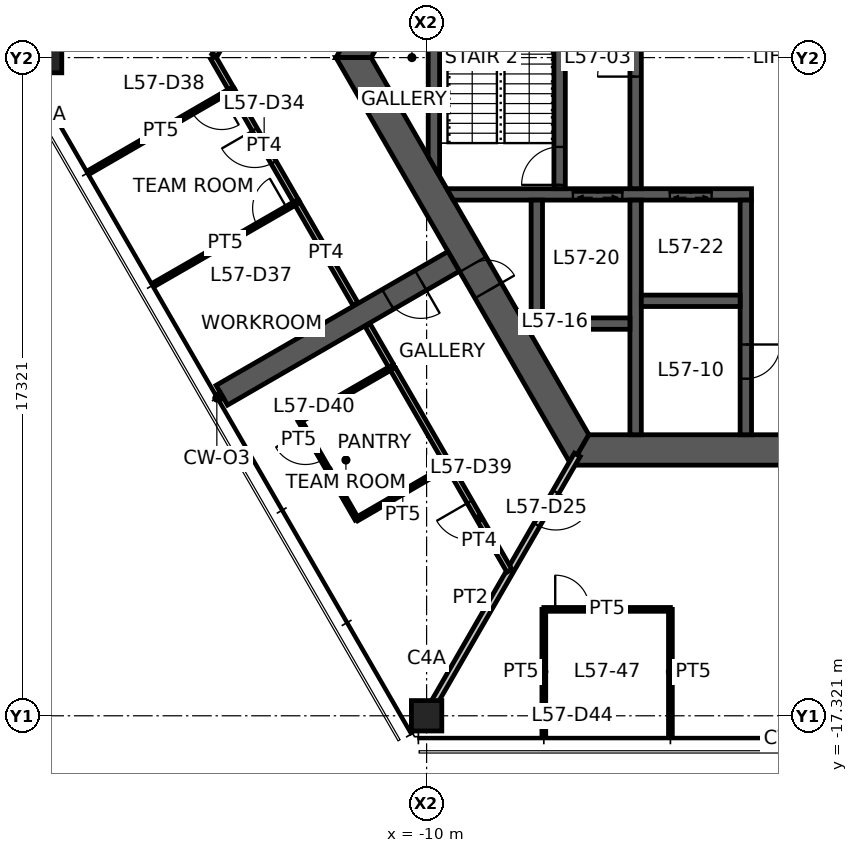
"""IFC4 building model, lengths in metres.
Left out: names, types, materials, properties, quantities, classifications, styles, units other than length and angle.
Written with IfcOpenShell. Run it as: python <this file> out.ifc"""

import sys

from ifc_helpers import new_model, si_unit, direction, frame, frame_2d, origin, origin_2d, place, context, subcontext, project, spatial, polyline, rectangle, hollow_rectangle, outline, extrude, element, fill, save


model = new_model("IFC4")
c1 = context("Model", 3, precision=1e-05, world=origin(), true_north=direction((0.0, 1.0)))
c2 = subcontext(c1, "Body", "Model", "MODEL_VIEW")
j1 = project(units=[si_unit("LENGTHUNIT", "METRE"), si_unit("PLANEANGLEUNIT", "RADIAN")], contexts=[c1])
p1 = place(None, origin())
s1 = spatial("IfcSite", under=j1, at=p1, CompositionType="ELEMENT")
p2 = place(p1, origin())
s2 = spatial("IfcBuilding", under=s1, at=p2, CompositionType="ELEMENT")
p3 = place(p2, frame((0.0, 0.0, 228.4)))
s3 = spatial("IfcBuildingStorey", under=s2, at=p3, CompositionType="ELEMENT", Elevation=228.4)
for number, where, z_axis, x_axis in (
    (1, (-20.0, 0.0, 0.0), (0.0, 0.0, 1.0), (1.0, 0.0, 0.0)),
    (2, (-10.0, -17.321, 0.0), (0.0, 0.0, 1.0), (1.0, 0.0, 0.0)),
):
    element("IfcColumn", number, at=place(p3, frame(where, z_axis=z_axis, x_axis=x_axis)), inside=s3, PredefinedType="COLUMN", context=c2, shape_type="SweptSolid", body=[
        extrude(hollow_rectangle(XDim=0.8, YDim=0.8, WallThickness=0.04, at=origin_2d()), origin(), (0.0, 0.0, 1.0), 3.9),
    ])
p4 = place(p3, frame((-5.961, 10.325, 0.0), z_axis=(0.0, 0.0, 1.0), x_axis=(-0.500004296715, -0.866022923061, 0.0)))
e3 = element("IfcWall", 3, at=p4, inside=s3, PredefinedType="SHEAR", context=c2, shape_type="SweptSolid", body=[
    extrude(outline(polyline([(-0.231, -0.4), (4.494, -0.4), (5.494, -0.4), (12.153, -0.4), (11.691, 0.4), (5.494, 0.4), (4.494, 0.4), (0.231, 0.4), (-0.231, -0.4)])), origin(), (0.0, 0.0, 1.0), 3.9),
])
p5 = place(p4, frame((4.494, 0.0, 0.0)))
e4 = element("IfcOpeningElement", 4, at=p5, cuts=e3, PredefinedType="OPENING", context=c2, shape_type="SweptSolid", body=[
    extrude(rectangle(XDim=1.0, YDim=2.1, at=frame_2d((0.5, 1.05))), frame((0.0, 0.41, 0.0), z_axis=(0.0, -1.0, 0.0), x_axis=(1.0, 0.0, 0.0)), (0.0, 0.0, 1.0), 0.82),
])
p6 = place(p3, frame((-11.922, 0.0, 0.0), z_axis=(0.0, 0.0, 1.0), x_axis=(0.500004296715, -0.866022923061, 0.0)))
e5 = element("IfcWall", 5, at=p6, inside=s3, PredefinedType="SHEAR", context=c2, shape_type="SweptSolid", body=[
    extrude(outline(polyline([(-0.231, -0.4), (6.281, -0.4), (7.081, -0.4), (12.153, -0.4), (11.691, 0.4), (7.081, 0.4), (6.281, 0.4), (0.231, 0.4), (-0.231, -0.4)])), origin(), (0.0, 0.0, 1.0), 3.9),
])
p7 = place(p6, frame((6.281, 0.0, 0.0)))
e6 = element("IfcOpeningElement", 6, at=p7, cuts=e5, PredefinedType="OPENING", context=c2, shape_type="SweptSolid", body=[
    extrude(rectangle(XDim=0.8, YDim=2.1, at=frame_2d((0.4, 1.05))), frame((0.0, 0.41, 0.0), z_axis=(0.0, -1.0, 0.0), x_axis=(1.0, 0.0, 0.0)), (0.0, 0.0, 1.0), 0.82),
])
p8 = place(p3, frame((-5.961, -10.325, 0.0), z_axis=(0.0, 0.0, 1.0), x_axis=(1.0, 0.0, 0.0)))
e7 = element("IfcWall", 7, at=p8, inside=s3, PredefinedType="SHEAR", context=c2, shape_type="SweptSolid", body=[
    extrude(outline(polyline([(-0.231, -0.4), (5.461, -0.4), (6.461, -0.4), (12.153, -0.4), (11.691, 0.4), (6.461, 0.4), (5.461, 0.4), (0.231, 0.4), (-0.231, -0.4)])), origin(), (0.0, 0.0, 1.0), 3.9),
])
p9 = place(p8, frame((5.461, 0.0, 0.0)))
e8 = element("IfcOpeningElement", 8, at=p9, cuts=e7, PredefinedType="OPENING", context=c2, shape_type="SweptSolid", body=[
    extrude(rectangle(XDim=1.0, YDim=2.1, at=frame_2d((0.5, 1.05))), frame((0.0, 0.41, 0.0), z_axis=(0.0, -1.0, 0.0), x_axis=(1.0, 0.0, 0.0)), (0.0, 0.0, 1.0), 0.82),
])
p10 = place(p3, frame((-9.288, -5.363, 0.0), z_axis=(0.0, 0.0, 1.0), x_axis=(-0.866027473358, -0.499996415376, 0.0)))
e9 = element("IfcWall", 9, at=p10, inside=s3, PredefinedType="SHEAR", context=c2, shape_type="SweptSolid", body=[
    extrude(rectangle(XDim=7.045, YDim=0.6, at=frame_2d((3.523, 0.0))), origin(), (0.0, 0.0, 1.0), 3.9),
])
p11 = place(p10, frame((1.0, 0.0, 0.0)))
e10 = element("IfcOpeningElement", 10, at=p11, cuts=e9, PredefinedType="OPENING", context=c2, shape_type="SweptSolid", body=[
    extrude(rectangle(XDim=1.0, YDim=2.1, at=frame_2d((0.5, 1.05))), frame((0.0, 0.31, 0.0), z_axis=(0.0, -1.0, 0.0), x_axis=(1.0, 0.0, 0.0)), (0.0, 0.0, 1.0), 0.62),
])
p12 = place(p3, frame((-9.382, -3.6, 0.0), z_axis=(0.0, 0.0, 1.0), x_axis=(1.0, 0.0, 0.0)))
e11 = element("IfcWall", 11, at=p12, inside=s3, PredefinedType="SHEAR", context=c2, shape_type="SweptSolid", body=[
    extrude(outline(polyline([(0.087, -0.15), (3.232, -0.15), (4.532, -0.15), (5.782, -0.15), (6.882, -0.15), (7.932, -0.15), (7.932, 0.15), (6.882, 0.15), (5.782, 0.15), (4.532, 0.15), (3.232, 0.15), (-0.087, 0.15), (0.087, -0.15)])), origin(), (0.0, 0.0, 1.0), 3.9),
])
p13 = place(p12, frame((5.782, 0.0, 0.0)))
e12 = element("IfcOpeningElement", 12, at=p13, cuts=e11, PredefinedType="OPENING", context=c2, shape_type="SweptSolid", body=[
    extrude(rectangle(XDim=1.1, YDim=2.1, at=frame_2d((0.55, 1.05))), frame((0.0, 0.16, 0.0), z_axis=(0.0, -1.0, 0.0), x_axis=(1.0, 0.0, 0.0)), (0.0, 0.0, 1.0), 0.32),
])
p14 = place(p12, frame((3.232, 0.0, 0.0)))
e13 = element("IfcOpeningElement", 13, at=p14, cuts=e11, PredefinedType="OPENING", context=c2, shape_type="SweptSolid", body=[
    extrude(rectangle(XDim=1.3, YDim=2.1, at=frame_2d((0.65, 1.05))), frame((0.0, 0.16, 0.0), z_axis=(0.0, -1.0, 0.0), x_axis=(1.0, 0.0, 0.0)), (0.0, 0.0, 1.0), 0.32),
])
p15 = place(p3, frame((-1.6, -3.75, 0.0), z_axis=(0.0, 0.0, 1.0), x_axis=(0.0, -1.0, 0.0)))
e14 = element("IfcWall", 14, at=p15, inside=s3, PredefinedType="SHEAR", context=c2, shape_type="SweptSolid", body=[
    extrude(rectangle(XDim=6.175, YDim=0.3, at=frame_2d((3.087, 0.0))), origin(), (0.0, 0.0, 1.0), 3.9),
])
p16 = place(p15, frame((3.8, 0.0, 0.0)))
e15 = element("IfcOpeningElement", 15, at=p16, cuts=e14, PredefinedType="OPENING", context=c2, shape_type="SweptSolid", body=[
    extrude(rectangle(XDim=0.9, YDim=2.1, at=frame_2d((0.45, 1.05))), frame((0.0, 0.16, 0.0), z_axis=(0.0, -1.0, 0.0), x_axis=(1.0, 0.0, 0.0)), (0.0, 0.0, 1.0), 0.32),
])
p17 = place(p3, frame((-4.5, -3.45, 0.0), z_axis=(0.0, 0.0, 1.0), x_axis=(0.0, 1.0, 0.0)))
e16 = element("IfcWall", 16, at=p17, inside=s3, PredefinedType="SHEAR", context=c2, shape_type="SweptSolid", body=[
    extrude(rectangle(XDim=6.9, YDim=0.3, at=frame_2d((3.45, 0.0))), origin(), (0.0, 0.0, 1.0), 3.9),
])
p18 = place(p17, frame((2.95, 0.0, 0.0)))
e17 = element("IfcOpeningElement", 17, at=p18, cuts=e16, PredefinedType="OPENING", context=c2, shape_type="SweptSolid", body=[
    extrude(rectangle(XDim=1.0, YDim=2.1, at=frame_2d((0.5, 1.05))), frame((0.0, 0.16, 0.0), z_axis=(0.0, -1.0, 0.0), x_axis=(1.0, 0.0, 0.0)), (0.0, 0.0, 1.0), 0.32),
])
p19 = place(p3, frame((-6.5, -3.45, 0.0), z_axis=(0.0, 0.0, 1.0), x_axis=(0.0, 1.0, 0.0)))
e18 = element("IfcWall", 18, at=p19, inside=s3, PredefinedType="SHEAR", context=c2, shape_type="SweptSolid", body=[
    extrude(rectangle(XDim=6.9, YDim=0.3, at=frame_2d((3.45, 0.0))), origin(), (0.0, 0.0, 1.0), 3.9),
])
p20 = place(p19, frame((0.1, 0.0, 0.0)))
e19 = element("IfcOpeningElement", 19, at=p20, cuts=e18, PredefinedType="OPENING", context=c2, shape_type="SweptSolid", body=[
    extrude(rectangle(XDim=1.0, YDim=2.1, at=frame_2d((0.5, 1.05))), frame((0.0, 0.16, 0.0), z_axis=(0.0, -1.0, 0.0), x_axis=(1.0, 0.0, 0.0)), (0.0, 0.0, 1.0), 0.32),
])
p21 = place(p3, frame((-4.5, -3.75, 0.0), z_axis=(0.0, 0.0, 1.0), x_axis=(0.0, -1.0, 0.0)))
e20 = element("IfcWall", 20, at=p21, inside=s3, PredefinedType="SHEAR", context=c2, shape_type="SweptSolid", body=[
    extrude(rectangle(XDim=6.175, YDim=0.3, at=frame_2d((3.087, 0.0))), origin(), (0.0, 0.0, 1.0), 3.9),
])
for number, where, z_axis, x_axis in (
    (21, (-4.35, -6.4, 0.0), (0.0, 0.0, 1.0), (1.0, 0.0, 0.0)),
    (22, (-7.25, -7.0, 0.0), (0.0, 0.0, 1.0), (1.0, 0.0, 0.0)),
):
    element("IfcWall", number, at=place(p3, frame(where, z_axis=z_axis, x_axis=x_axis)), inside=s3, PredefinedType="SHEAR", context=c2, shape_type="SweptSolid", body=[
        extrude(rectangle(XDim=2.6, YDim=0.3, at=frame_2d((1.3, 0.0))), origin(), (0.0, 0.0, 1.0), 3.9),
    ])
p22 = place(p3, frame((-7.1, -3.75, 0.0), z_axis=(0.0, 0.0, 1.0), x_axis=(0.0, -1.0, 0.0)))
e23 = element("IfcWall", 23, at=p22, inside=s3, PredefinedType="SHEAR", context=c2, shape_type="SweptSolid", body=[
    extrude(rectangle(XDim=3.1, YDim=0.3, at=frame_2d((1.55, 0.0))), origin(), (0.0, 0.0, 1.0), 3.9),
])
p23 = place(p3, frame((-9.808, -2.862, 0.0), z_axis=(0.0, 0.0, 1.0), x_axis=(0.0, 1.0, 0.0)))
e24 = element("IfcWall", 24, at=p23, inside=s3, PredefinedType="SHEAR", context=c2, shape_type="SweptSolid", body=[
    extrude(outline(polyline([(-0.26, -0.15), (5.984, -0.15), (5.465, 0.15), (0.26, 0.15), (-0.26, -0.15)])), origin(), (0.0, 0.0, 1.0), 3.9),
])
p24 = place(p3, frame((-6.035, -10.453, 0.0), z_axis=(0.0, 0.0, 1.0), x_axis=(-0.499989830942, -0.866031274813, 0.0)))
e25 = element("IfcWall", 25, at=p24, inside=s3, PredefinedType="PARTITIONING", context=c2, shape_type="SweptSolid", body=[
    extrude(rectangle(XDim=7.93, YDim=0.175, at=frame_2d((3.965, 0.0))), origin(), (0.0, 0.0, 1.0), 3.05),
])
p25 = place(p24, frame((1.13, 0.0, 0.0)))
e26 = element("IfcOpeningElement", 26, at=p25, cuts=e25, PredefinedType="OPENING", context=c2, shape_type="SweptSolid", body=[
    extrude(rectangle(XDim=1.0, YDim=2.1, at=frame_2d((0.5, 1.05))), frame((0.0, 0.098, 0.0), z_axis=(0.0, -1.0, 0.0), x_axis=(1.0, 0.0, 0.0)), (0.0, 0.0, 1.0), 0.195),
])
p26 = place(p3, frame((-11.873, -6.485, 0.0), z_axis=(0.0, 0.0, 1.0), x_axis=(-0.499958760481, 0.866049212123, 0.0)))
e27 = element("IfcWall", 27, at=p26, inside=s3, PredefinedType="PARTITIONING", context=c2, shape_type="SweptSolid", body=[
    extrude(rectangle(XDim=3.1, YDim=0.15, at=frame_2d((1.55, 0.0))), origin(), (0.0, 0.0, 1.0), 2.95),
])
p27 = place(p3, frame((-15.585, 0.056, 0.0), z_axis=(0.0, 0.0, 1.0), x_axis=(0.500164219654, 0.865930570761, 0.0)))
e28 = element("IfcWall", 28, at=p27, inside=s3, PredefinedType="PARTITIONING", context=c2, shape_type="SweptSolid", body=[
    extrude(rectangle(XDim=0.287, YDim=0.15, at=frame_2d((0.144, 0.0))), origin(), (0.0, 0.0, 1.0), 2.95),
])
p28 = place(p3, frame((-15.126, -0.851, 0.0), z_axis=(0.0, 0.0, 1.0), x_axis=(-0.499880173341, 0.866094574686, 0.0)))
e29 = element("IfcWall", 29, at=p28, inside=s3, PredefinedType="PARTITIONING", context=c2, shape_type="SweptSolid", body=[
    extrude(rectangle(XDim=0.983, YDim=0.15, at=frame_2d((0.491, 0.0))), origin(), (0.0, 0.0, 1.0), 2.95),
])
p29 = place(p3, frame((-13.418, -3.809, 0.0), z_axis=(0.0, 0.0, 1.0), x_axis=(-0.499996058069, 0.866027679647, 0.0)))
e30 = element("IfcWall", 30, at=p29, inside=s3, PredefinedType="PARTITIONING", context=c2, shape_type="SweptSolid", body=[
    extrude(rectangle(XDim=3.424, YDim=0.15, at=frame_2d((1.712, 0.0))), origin(), (0.0, 0.0, 1.0), 2.95),
])
p30 = place(p29, frame((1.212, 0.0, 0.0)))
e31 = element("IfcOpeningElement", 31, at=p30, cuts=e30, PredefinedType="OPENING", context=c2, shape_type="SweptSolid", body=[
    extrude(rectangle(XDim=1.0, YDim=2.1, at=frame_2d((0.5, 1.05))), frame((0.0, 0.085, 0.0), z_axis=(0.0, -1.0, 0.0), x_axis=(1.0, 0.0, 0.0)), (0.0, 0.0, 1.0), 0.17),
])
p31 = place(p3, frame((-17.171, -5.97, 0.0), z_axis=(0.0, 0.0, 1.0), x_axis=(0.866548575966, 0.499092742374, 0.0)))
e32 = element("IfcWall", 32, at=p31, inside=s3, PredefinedType="PARTITIONING", context=c2, shape_type="SweptSolid", body=[
    extrude(rectangle(XDim=4.331, YDim=0.1, at=frame_2d((2.165, 0.0))), origin(), (0.0, 0.0, 1.0), 2.95),
])
p32 = place(p31, frame((3.131, 0.0, 0.0)))
e33 = element("IfcOpeningElement", 33, at=p32, cuts=e32, PredefinedType="OPENING", context=c2, shape_type="SweptSolid", body=[
    extrude(rectangle(XDim=0.9, YDim=2.1, at=frame_2d((0.45, 1.05))), frame((0.0, 0.06, 0.0), z_axis=(0.0, -1.0, 0.0), x_axis=(1.0, 0.0, 0.0)), (0.0, 0.0, 1.0), 0.12),
])
p33 = place(p3, frame((-15.131, -0.843, 0.0), z_axis=(0.0, 0.0, 1.0), x_axis=(-0.865525911664, -0.500864149484, 0.0)))
e34 = element("IfcWall", 34, at=p33, inside=s3, PredefinedType="PARTITIONING", context=c2, shape_type="SweptSolid", body=[
    extrude(rectangle(XDim=4.306, YDim=0.1, at=frame_2d((2.153, 0.0))), origin(), (0.0, 0.0, 1.0), 2.95),
])
p34 = place(p33, frame((0.3, 0.0, 0.0)))
e35 = element("IfcOpeningElement", 35, at=p34, cuts=e34, PredefinedType="OPENING", context=c2, shape_type="SweptSolid", body=[
    extrude(rectangle(XDim=0.9, YDim=2.1, at=frame_2d((0.45, 1.05))), frame((0.0, 0.06, 0.0), z_axis=(0.0, -1.0, 0.0), x_axis=(1.0, 0.0, 0.0)), (0.0, 0.0, 1.0), 0.12),
])
p35 = place(p3, frame((-9.41, -10.75, 0.0), z_axis=(0.0, 0.0, 1.0), x_axis=(-0.500038395149, 0.8660032352, 0.0)))
e36 = element("IfcWall", 36, at=p35, inside=s3, PredefinedType="PARTITIONING", context=c2, shape_type="SweptSolid", body=[
    extrude(rectangle(XDim=3.01, YDim=0.15, at=frame_2d((1.505, 0.0))), origin(), (0.0, 0.0, 1.0), 2.95),
])
p36 = place(p3, frame((-10.911, -8.152, 0.0), z_axis=(0.0, 0.0, 1.0), x_axis=(-0.499859560919, 0.866106471144, 0.0)))
e37 = element("IfcWall", 37, at=p36, inside=s3, PredefinedType="PARTITIONING", context=c2, shape_type="SweptSolid", body=[
    extrude(rectangle(XDim=1.284, YDim=0.15, at=frame_2d((0.642, 0.0))), origin(), (0.0, 0.0, 1.0), 2.95),
])
p37 = place(p3, frame((-7.82, -13.505, 0.0), z_axis=(0.0, 0.0, 1.0), x_axis=(-0.499983030129, 0.866035201123, 0.0)))
e38 = element("IfcWall", 38, at=p37, inside=s3, PredefinedType="PARTITIONING", context=c2, shape_type="SweptSolid", body=[
    extrude(rectangle(XDim=3.19, YDim=0.15, at=frame_2d((1.595, 0.0))), origin(), (0.0, 0.0, 1.0), 2.95),
])
p38 = place(p37, frame((1.095, 0.0, 0.0)))
e39 = element("IfcOpeningElement", 39, at=p38, cuts=e38, PredefinedType="OPENING", context=c2, shape_type="SweptSolid", body=[
    extrude(rectangle(XDim=1.0, YDim=2.1, at=frame_2d((0.5, 1.05))), frame((0.0, 0.085, 0.0), z_axis=(0.0, -1.0, 0.0), x_axis=(1.0, 0.0, 0.0)), (0.0, 0.0, 1.0), 0.17),
])
p39 = place(p3, frame((-13.338, -9.548, 0.0), z_axis=(0.0, 0.0, 1.0), x_axis=(0.866833758708, 0.498597267105, 0.0)))
e40 = element("IfcWall", 40, at=p39, inside=s3, PredefinedType="PARTITIONING", context=c2, shape_type="SweptSolid", body=[
    extrude(rectangle(XDim=2.8, YDim=0.1, at=frame_2d((1.4, 0.0))), origin(), (0.0, 0.0, 1.0), 2.95),
])
p40 = place(p3, frame((-11.838, -12.146, 0.0), z_axis=(0.0, 0.0, 1.0), x_axis=(-0.499990139034, 0.866031096941, 0.0)))
e41 = element("IfcWall", 41, at=p40, inside=s3, PredefinedType="PARTITIONING", context=c2, shape_type="SweptSolid", body=[
    extrude(rectangle(XDim=3.0, YDim=0.1, at=frame_2d((1.5, 0.0))), origin(), (0.0, 0.0, 1.0), 2.95),
])
p41 = place(p40, frame((1.8, 0.0, 0.0)))
e42 = element("IfcOpeningElement", 42, at=p41, cuts=e41, PredefinedType="OPENING", context=c2, shape_type="SweptSolid", body=[
    extrude(rectangle(XDim=0.9, YDim=2.1, at=frame_2d((0.45, 1.05))), frame((0.0, 0.06, 0.0), z_axis=(0.0, -1.0, 0.0), x_axis=(1.0, 0.0, 0.0)), (0.0, 0.0, 1.0), 0.12),
])
p42 = place(p3, frame((-9.415, -10.742, 0.0), z_axis=(0.0, 0.0, 1.0), x_axis=(-0.865195372903, -0.501434907746, 0.0)))
e43 = element("IfcWall", 43, at=p42, inside=s3, PredefinedType="PARTITIONING", context=c2, shape_type="SweptSolid", body=[
    extrude(rectangle(XDim=2.8, YDim=0.1, at=frame_2d((1.4, 0.0))), origin(), (0.0, 0.0, 1.0), 2.95),
])
p43 = place(p3, frame((-6.916, -17.801, 0.0), z_axis=(0.0, 0.0, 1.0), x_axis=(0.0, 1.0, 0.0)))
e44 = element("IfcWall", 44, at=p43, inside=s3, PredefinedType="PARTITIONING", context=c2, shape_type="SweptSolid", body=[
    extrude(rectangle(XDim=3.28, YDim=0.1, at=frame_2d((1.64, 0.0))), origin(), (0.0, 0.0, 1.0), 2.95),
])
p44 = place(p3, frame((-6.916, -14.521, 0.0), z_axis=(0.0, 0.0, 1.0), x_axis=(1.0, 0.0, 0.0)))
e45 = element("IfcWall", 45, at=p44, inside=s3, PredefinedType="PARTITIONING", context=c2, shape_type="SweptSolid", body=[
    extrude(rectangle(XDim=3.331, YDim=0.1, at=frame_2d((1.666, 0.0))), origin(), (0.0, 0.0, 1.0), 2.95),
])
p45 = place(p44, frame((0.3, 0.0, 0.0)))
e46 = element("IfcOpeningElement", 46, at=p45, cuts=e45, PredefinedType="OPENING", context=c2, shape_type="SweptSolid", body=[
    extrude(rectangle(XDim=0.9, YDim=2.1, at=frame_2d((0.45, 1.05))), frame((0.0, 0.06, 0.0), z_axis=(0.0, -1.0, 0.0), x_axis=(1.0, 0.0, 0.0)), (0.0, 0.0, 1.0), 0.12),
])
p46 = place(p3, frame((-3.584, -14.521, 0.0), z_axis=(0.0, 0.0, 1.0), x_axis=(0.0, -1.0, 0.0)))
e47 = element("IfcWall", 47, at=p46, inside=s3, PredefinedType="PARTITIONING", context=c2, shape_type="SweptSolid", body=[
    extrude(rectangle(XDim=3.28, YDim=0.1, at=frame_2d((1.64, 0.0))), origin(), (0.0, 0.0, 1.0), 2.95),
])
p47 = place(p3, frame((-15.39, -8.885, 0.0), z_axis=(0.0, 0.0, 1.0), x_axis=(-0.866472036435, -0.499225610396, 0.0)))
e48 = element("IfcWall", 48, at=p47, inside=s3, PredefinedType="PARTITIONING", context=c2, shape_type="SweptSolid", body=[
    extrude(rectangle(XDim=0.085, YDim=0.175, at=frame_2d((0.042, 0.0))), origin(), (0.0, 0.0, 1.0), 3.9),
])
p48 = place(p7, origin())
e49 = element("IfcDoor", 49, at=p48, inside=s3, OperationType="SINGLE_SWING_RIGHT", PredefinedType="DOOR", context=c2, shape_type="SweptSolid", body=[
    extrude(rectangle(XDim=0.8, YDim=2.1, at=frame_2d((0.4, 1.05))), frame((0.0, 0.025, 0.0), z_axis=(0.0, -1.0, 0.0), x_axis=(1.0, 0.0, 0.0)), (0.0, 0.0, 1.0), 0.05),
])
fill(e6, e49)
p49 = place(p18, origin())
e50 = element("IfcDoor", 50, at=p49, inside=s3, OperationType="SINGLE_SWING_LEFT", PredefinedType="DOOR", context=c2, shape_type="SweptSolid", body=[
    extrude(rectangle(XDim=1.0, YDim=2.1, at=frame_2d((0.5, 1.05))), frame((0.0, 0.025, 0.0), z_axis=(0.0, -1.0, 0.0), x_axis=(1.0, 0.0, 0.0)), (0.0, 0.0, 1.0), 0.05),
])
fill(e17, e50)
p50 = place(p20, origin())
e51 = element("IfcDoor", 51, at=p50, inside=s3, OperationType="SINGLE_SWING_LEFT", PredefinedType="DOOR", context=c2, shape_type="SweptSolid", body=[
    extrude(rectangle(XDim=1.0, YDim=2.1, at=frame_2d((0.5, 1.05))), frame((0.0, 0.025, 0.0), z_axis=(0.0, -1.0, 0.0), x_axis=(1.0, 0.0, 0.0)), (0.0, 0.0, 1.0), 0.05),
])
fill(e19, e51)
p51 = place(p16, origin())
e52 = element("IfcDoor", 52, at=p51, inside=s3, OperationType="SINGLE_SWING_LEFT", PredefinedType="DOOR", context=c2, shape_type="SweptSolid", body=[
    extrude(rectangle(XDim=0.9, YDim=2.1, at=frame_2d((0.45, 1.05))), frame((0.0, 0.025, 0.0), z_axis=(0.0, -1.0, 0.0), x_axis=(1.0, 0.0, 0.0)), (0.0, 0.0, 1.0), 0.05),
])
fill(e15, e52)
p52 = place(p11, origin())
e53 = element("IfcDoor", 53, at=p52, inside=s3, OperationType="SINGLE_SWING_LEFT", PredefinedType="DOOR", context=c2, shape_type="SweptSolid", body=[
    extrude(rectangle(XDim=1.0, YDim=2.1, at=frame_2d((0.5, 1.05))), frame((0.0, 0.025, 0.0), z_axis=(0.0, -1.0, 0.0), x_axis=(1.0, 0.0, 0.0)), (0.0, 0.0, 1.0), 0.05),
])
fill(e10, e53)
p53 = place(p25, origin())
e54 = element("IfcDoor", 54, at=p53, inside=s3, OperationType="SINGLE_SWING_LEFT", PredefinedType="DOOR", context=c2, shape_type="SweptSolid", body=[
    extrude(rectangle(XDim=1.0, YDim=2.1, at=frame_2d((0.5, 1.05))), frame((0.0, 0.025, 0.0), z_axis=(0.0, -1.0, 0.0), x_axis=(1.0, 0.0, 0.0)), (0.0, 0.0, 1.0), 0.05),
])
fill(e26, e54)
p54 = place(p30, origin())
e55 = element("IfcDoor", 55, at=p54, inside=s3, OperationType="SINGLE_SWING_RIGHT", PredefinedType="DOOR", context=c2, shape_type="SweptSolid", body=[
    extrude(rectangle(XDim=1.0, YDim=2.1, at=frame_2d((0.5, 1.05))), frame((0.0, 0.025, 0.0), z_axis=(0.0, -1.0, 0.0), x_axis=(1.0, 0.0, 0.0)), (0.0, 0.0, 1.0), 0.05),
])
fill(e31, e55)
p55 = place(p32, origin())
e56 = element("IfcDoor", 56, at=p55, inside=s3, OperationType="SINGLE_SWING_RIGHT", PredefinedType="DOOR", context=c2, shape_type="SweptSolid", body=[
    extrude(rectangle(XDim=0.9, YDim=2.1, at=frame_2d((0.45, 1.05))), frame((0.0, 0.025, 0.0), z_axis=(0.0, -1.0, 0.0), x_axis=(1.0, 0.0, 0.0)), (0.0, 0.0, 1.0), 0.05),
])
fill(e33, e56)
p56 = place(p34, origin())
e57 = element("IfcDoor", 57, at=p56, inside=s3, OperationType="SINGLE_SWING_LEFT", PredefinedType="DOOR", context=c2, shape_type="SweptSolid", body=[
    extrude(rectangle(XDim=0.9, YDim=2.1, at=frame_2d((0.45, 1.05))), frame((0.0, 0.025, 0.0), z_axis=(0.0, -1.0, 0.0), x_axis=(1.0, 0.0, 0.0)), (0.0, 0.0, 1.0), 0.05),
])
fill(e35, e57)
p57 = place(p38, origin())
e58 = element("IfcDoor", 58, at=p57, inside=s3, OperationType="SINGLE_SWING_RIGHT", PredefinedType="DOOR", context=c2, shape_type="SweptSolid", body=[
    extrude(rectangle(XDim=1.0, YDim=2.1, at=frame_2d((0.5, 1.05))), frame((0.0, 0.025, 0.0), z_axis=(0.0, -1.0, 0.0), x_axis=(1.0, 0.0, 0.0)), (0.0, 0.0, 1.0), 0.05),
])
fill(e39, e58)
p58 = place(p41, origin())
e59 = element("IfcDoor", 59, at=p58, inside=s3, OperationType="SINGLE_SWING_RIGHT", PredefinedType="DOOR", context=c2, shape_type="SweptSolid", body=[
    extrude(rectangle(XDim=0.9, YDim=2.1, at=frame_2d((0.45, 1.05))), frame((0.0, 0.025, 0.0), z_axis=(0.0, -1.0, 0.0), x_axis=(1.0, 0.0, 0.0)), (0.0, 0.0, 1.0), 0.05),
])
fill(e42, e59)
p59 = place(p45, origin())
e60 = element("IfcDoor", 60, at=p59, inside=s3, OperationType="SINGLE_SWING_LEFT", PredefinedType="DOOR", context=c2, shape_type="SweptSolid", body=[
    extrude(rectangle(XDim=0.9, YDim=2.1, at=frame_2d((0.45, 1.05))), frame((0.0, 0.025, 0.0), z_axis=(0.0, -1.0, 0.0), x_axis=(1.0, 0.0, 0.0)), (0.0, 0.0, 1.0), 0.05),
])
fill(e46, e60)
p60 = place(p13, origin())
e61 = element("IfcDoor", 61, at=p60, inside=s3, OperationType="DOUBLE_DOOR_SLIDING", PredefinedType="DOOR", context=c2, shape_type="SweptSolid", body=[
    extrude(rectangle(XDim=1.1, YDim=2.1, at=frame_2d((0.55, 1.05))), frame((0.0, 0.025, 0.0), z_axis=(0.0, -1.0, 0.0), x_axis=(1.0, 0.0, 0.0)), (0.0, 0.0, 1.0), 0.05),
])
fill(e12, e61)
p61 = place(p14, origin())
e62 = element("IfcDoor", 62, at=p61, inside=s3, OperationType="DOUBLE_DOOR_SLIDING", PredefinedType="DOOR", context=c2, shape_type="SweptSolid", body=[
    extrude(rectangle(XDim=1.3, YDim=2.1, at=frame_2d((0.65, 1.05))), frame((0.0, 0.025, 0.0), z_axis=(0.0, -1.0, 0.0), x_axis=(1.0, 0.0, 0.0)), (0.0, 0.0, 1.0), 0.05),
])
fill(e13, e62)
save(model, sys.argv[1])
